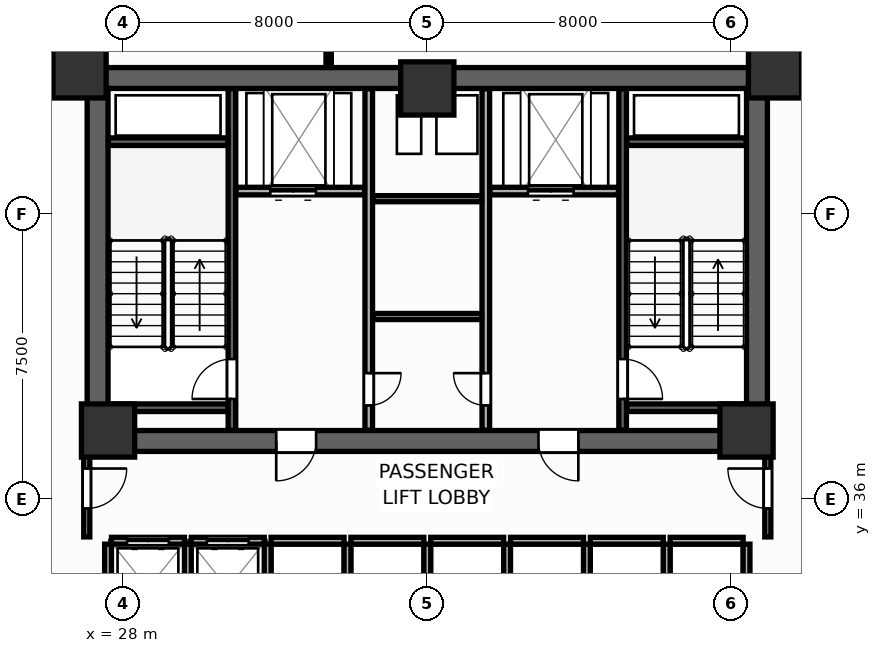
"""IFC4 building model, lengths in metres.
Left out: names, types, materials, properties, quantities, classifications, styles, units other than length and angle.
Written with IfcOpenShell. Run it as: python <this file> out.ifc"""

import sys

from ifc_helpers import new_model, si_unit, direction, frame, frame_2d, origin, origin_2d, place, context, subcontext, project, spatial, rectangle, extrude, source, transform, mapped, element, fill, save


model = new_model("IFC4")
c1 = context("Model", 3, precision=1e-05, world=origin(), true_north=direction((0.0, 1.0)))
c2 = subcontext(c1, "Body", "Model", "MODEL_VIEW")
j1 = project(units=[si_unit("LENGTHUNIT", "METRE"), si_unit("PLANEANGLEUNIT", "RADIAN")], contexts=[c1])
p1 = place(None, origin())
s1 = spatial("IfcSite", under=j1, at=p1, CompositionType="ELEMENT")
p2 = place(p1, origin())
s2 = spatial("IfcBuilding", under=s1, at=p2, CompositionType="ELEMENT")
p3 = place(p2, frame((0.0, 0.0, 31.8)))
s3 = spatial("IfcBuildingStorey", under=s2, at=p3, CompositionType="ELEMENT", Elevation=31.8)
p4 = place(p3, frame((27.05, 47.075, 0.0), z_axis=(0.0, 0.0, 1.0), x_axis=(1.0, 0.0, 0.0)))
e1 = element("IfcWall", 1, at=p4, inside=s3, PredefinedType="SHEAR", context=c2, shape_type="SweptSolid", body=[
    extrude(rectangle(XDim=17.9, YDim=0.55, at=frame_2d((8.95, 0.0))), origin(), (0.0, 0.0, 1.0), 3.9),
])
p5 = place(p3, frame((27.05, 37.525, 0.0), z_axis=(0.0, 0.0, 1.0), x_axis=(1.0, 0.0, 0.0)))
e2 = element("IfcWall", 2, at=p5, inside=s3, PredefinedType="SHEAR", context=c2, shape_type="SweptSolid", body=[
    extrude(rectangle(XDim=17.9, YDim=0.55, at=frame_2d((8.95, 0.0))), origin(), (0.0, 0.0, 1.0), 3.9),
])
p6 = place(p5, frame((4.975, 0.0, 0.0)))
e3 = element("IfcOpeningElement", 3, at=p6, cuts=e2, PredefinedType="OPENING", context=c2, shape_type="SweptSolid", body=[
    extrude(rectangle(XDim=1.05, YDim=2.1, at=frame_2d((0.525, 1.05))), frame((0.0, 0.285, 0.0), z_axis=(0.0, -1.0, 0.0), x_axis=(1.0, 0.0, 0.0)), (0.0, 0.0, 1.0), 0.57),
])
p7 = place(p5, frame((11.875, 0.0, 0.0)))
e4 = element("IfcOpeningElement", 4, at=p7, cuts=e2, PredefinedType="OPENING", context=c2, shape_type="SweptSolid", body=[
    extrude(rectangle(XDim=1.05, YDim=2.1, at=frame_2d((0.525, 1.05))), frame((0.0, 0.285, 0.0), z_axis=(0.0, -1.0, 0.0), x_axis=(1.0, 0.0, 0.0)), (0.0, 0.0, 1.0), 0.57),
])
for number, where, z_axis, x_axis in (
    (5, (27.325, 37.8, 0.0), (0.0, 0.0, 1.0), (0.0, 1.0, 0.0)),
    (6, (44.675, 37.8, 0.0), (0.0, 0.0, 1.0), (0.0, 1.0, 0.0)),
):
    element("IfcWall", number, at=place(p3, frame(where, z_axis=z_axis, x_axis=x_axis)), inside=s3, PredefinedType="SHEAR", context=c2, shape_type="SweptSolid", body=[
        extrude(rectangle(XDim=9.0, YDim=0.55, at=frame_2d((4.5, 0.0))), origin(), (0.0, 0.0, 1.0), 3.9),
    ])
m1 = source(origin(), c2, "Body", "SweptSolid", [
    extrude(rectangle(XDim=1.4, YDim=1.4, at=origin_2d()), origin(), (0.0, 0.0, 1.0), 3.9),
])
for number, where, z_axis, x_axis in (
    (7, (26.85, 47.25, 0.0), (0.0, 0.0, 1.0), (1.0, 0.0, 0.0)),
    (8, (45.15, 47.25, 0.0), (0.0, 0.0, 1.0), (1.0, 0.0, 0.0)),
    (9, (27.6, 37.8, 0.0), (0.0, 0.0, 1.0), (1.0, 0.0, 0.0)),
    (10, (44.4, 37.8, 0.0), (0.0, 0.0, 1.0), (1.0, 0.0, 0.0)),
    (11, (36.0, 46.8, 0.0), (0.0, 0.0, 1.0), (1.0, 0.0, 0.0)),
):
    element("IfcColumn", number, at=place(p3, frame(where, z_axis=z_axis, x_axis=x_axis)), inside=s3, PredefinedType="COLUMN", context=c2, shape_type="MappedRepresentation", body=[
        mapped(m1, transform((0.0, 0.0, 0.0), scale=1.0)),
    ])
p8 = place(p3, frame((30.86, 37.81, 0.0), z_axis=(0.0, 0.0, 1.0), x_axis=(0.0, 1.0, 0.0)))
e12 = element("IfcWall", 12, at=p8, inside=s3, PredefinedType="SHEAR", context=c2, shape_type="SweptSolid", body=[
    extrude(rectangle(XDim=8.98, YDim=0.2, at=frame_2d((4.49, 0.0))), origin(), (0.0, 0.0, 1.0), 3.9),
])
p9 = place(p8, frame((0.82, 0.0, 0.0)))
e13 = element("IfcOpeningElement", 13, at=p9, cuts=e12, PredefinedType="OPENING", context=c2, shape_type="SweptSolid", body=[
    extrude(rectangle(XDim=1.05, YDim=2.1, at=frame_2d((0.525, 1.05))), frame((0.0, 0.11, 0.0), z_axis=(0.0, -1.0, 0.0), x_axis=(1.0, 0.0, 0.0)), (0.0, 0.0, 1.0), 0.22),
])
for number, where, z_axis, x_axis in (
    (14, (27.61, 45.4, 0.0), (0.0, 0.0, 1.0), (1.0, 0.0, 0.0)),
    (15, (27.61, 38.4, 0.0), (0.0, 0.0, 1.0), (1.0, 0.0, 0.0)),
):
    element("IfcWall", number, at=place(p3, frame(where, z_axis=z_axis, x_axis=x_axis)), inside=s3, PredefinedType="SHEAR", context=c2, shape_type="SweptSolid", body=[
        extrude(rectangle(XDim=3.14, YDim=0.2, at=frame_2d((1.57, 0.0))), origin(), (0.0, 0.0, 1.0), 3.9),
    ])
p10 = place(p3, frame((41.14, 37.81, 0.0), z_axis=(0.0, 0.0, 1.0), x_axis=(0.0, 1.0, 0.0)))
e16 = element("IfcWall", 16, at=p10, inside=s3, PredefinedType="SHEAR", context=c2, shape_type="SweptSolid", body=[
    extrude(rectangle(XDim=8.98, YDim=0.2, at=frame_2d((4.49, 0.0))), origin(), (0.0, 0.0, 1.0), 3.9),
])
p11 = place(p10, frame((0.82, 0.0, 0.0)))
e17 = element("IfcOpeningElement", 17, at=p11, cuts=e16, PredefinedType="OPENING", context=c2, shape_type="SweptSolid", body=[
    extrude(rectangle(XDim=1.05, YDim=2.1, at=frame_2d((0.525, 1.05))), frame((0.0, 0.11, 0.0), z_axis=(0.0, -1.0, 0.0), x_axis=(1.0, 0.0, 0.0)), (0.0, 0.0, 1.0), 0.22),
])
for number, where, z_axis, x_axis in (
    (18, (41.25, 45.4, 0.0), (0.0, 0.0, 1.0), (1.0, 0.0, 0.0)),
    (19, (41.25, 38.4, 0.0), (0.0, 0.0, 1.0), (1.0, 0.0, 0.0)),
):
    element("IfcWall", number, at=place(p3, frame(where, z_axis=z_axis, x_axis=x_axis)), inside=s3, PredefinedType="SHEAR", context=c2, shape_type="SweptSolid", body=[
        extrude(rectangle(XDim=3.14, YDim=0.2, at=frame_2d((1.57, 0.0))), origin(), (0.0, 0.0, 1.0), 3.9),
    ])
p12 = place(p3, frame((30.97, 44.1, 0.0), z_axis=(0.0, 0.0, 1.0), x_axis=(1.0, 0.0, 0.0)))
e20 = element("IfcWall", 20, at=p12, inside=s3, PredefinedType="PARTITIONING", context=c2, shape_type="SweptSolid", body=[
    extrude(rectangle(XDim=3.38, YDim=0.2, at=frame_2d((1.69, 0.0))), origin(), (0.0, 0.0, 1.0), 3.68),
])
p13 = place(p12, frame((0.9, 0.0, 0.0)))
e21 = element("IfcOpeningElement", 21, at=p13, cuts=e20, PredefinedType="OPENING", context=c2, shape_type="SweptSolid", body=[
    extrude(rectangle(XDim=1.2, YDim=2.1, at=frame_2d((0.6, 1.05))), frame((0.0, 0.11, 0.0), z_axis=(0.0, -1.0, 0.0), x_axis=(1.0, 0.0, 0.0)), (0.0, 0.0, 1.0), 0.22),
])
p14 = place(p3, frame((37.65, 44.1, 0.0), z_axis=(0.0, 0.0, 1.0), x_axis=(1.0, 0.0, 0.0)))
e22 = element("IfcWall", 22, at=p14, inside=s3, PredefinedType="PARTITIONING", context=c2, shape_type="SweptSolid", body=[
    extrude(rectangle(XDim=3.38, YDim=0.2, at=frame_2d((1.69, 0.0))), origin(), (0.0, 0.0, 1.0), 3.68),
])
p15 = place(p14, frame((1.0, 0.0, 0.0)))
e23 = element("IfcOpeningElement", 23, at=p15, cuts=e22, PredefinedType="OPENING", context=c2, shape_type="SweptSolid", body=[
    extrude(rectangle(XDim=1.2, YDim=2.1, at=frame_2d((0.6, 1.05))), frame((0.0, 0.11, 0.0), z_axis=(0.0, -1.0, 0.0), x_axis=(1.0, 0.0, 0.0)), (0.0, 0.0, 1.0), 0.22),
])
p16 = place(p3, frame((34.46, 37.81, 0.0), z_axis=(0.0, 0.0, 1.0), x_axis=(0.0, 1.0, 0.0)))
e24 = element("IfcWall", 24, at=p16, inside=s3, PredefinedType="PARTITIONING", context=c2, shape_type="SweptSolid", body=[
    extrude(rectangle(XDim=8.98, YDim=0.2, at=frame_2d((4.49, 0.0))), origin(), (0.0, 0.0, 1.0), 3.68),
])
p17 = place(p16, frame((0.65, 0.0, 0.0)))
e25 = element("IfcOpeningElement", 25, at=p17, cuts=e24, PredefinedType="OPENING", context=c2, shape_type="SweptSolid", body=[
    extrude(rectangle(XDim=0.85, YDim=2.05, at=frame_2d((0.425, 1.025))), frame((0.0, 0.11, 0.0), z_axis=(0.0, -1.0, 0.0), x_axis=(1.0, 0.0, 0.0)), (0.0, 0.0, 1.0), 0.22),
])
p18 = place(p3, frame((37.54, 37.81, 0.0), z_axis=(0.0, 0.0, 1.0), x_axis=(0.0, 1.0, 0.0)))
e26 = element("IfcWall", 26, at=p18, inside=s3, PredefinedType="PARTITIONING", context=c2, shape_type="SweptSolid", body=[
    extrude(rectangle(XDim=8.98, YDim=0.2, at=frame_2d((4.49, 0.0))), origin(), (0.0, 0.0, 1.0), 3.68),
])
p19 = place(p18, frame((0.65, 0.0, 0.0)))
e27 = element("IfcOpeningElement", 27, at=p19, cuts=e26, PredefinedType="OPENING", context=c2, shape_type="SweptSolid", body=[
    extrude(rectangle(XDim=0.85, YDim=2.05, at=frame_2d((0.425, 1.025))), frame((0.0, 0.11, 0.0), z_axis=(0.0, -1.0, 0.0), x_axis=(1.0, 0.0, 0.0)), (0.0, 0.0, 1.0), 0.22),
])
for number, where, z_axis, x_axis in (
    (28, (34.57, 40.8, 0.0), (0.0, 0.0, 1.0), (1.0, 0.0, 0.0)),
    (29, (34.57, 43.9, 0.0), (0.0, 0.0, 1.0), (1.0, 0.0, 0.0)),
):
    element("IfcWall", number, at=place(p3, frame(where, z_axis=z_axis, x_axis=x_axis)), inside=s3, PredefinedType="PARTITIONING", context=c2, shape_type="SweptSolid", body=[
        extrude(rectangle(XDim=2.86, YDim=0.16, at=frame_2d((1.43, 0.0))), origin(), (0.0, 0.0, 1.0), 3.68),
    ])
p20 = place(p3, frame((27.69, 34.9, 0.0), z_axis=(0.0, 0.0, 1.0), x_axis=(1.0, 0.0, 0.0)))
e30 = element("IfcWall", 30, at=p20, inside=s3, PredefinedType="PARTITIONING", context=c2, shape_type="SweptSolid", body=[
    extrude(rectangle(XDim=1.92, YDim=0.18, at=frame_2d((0.96, 0.0))), origin(), (0.0, 0.0, 1.0), 3.68),
])
p21 = place(p20, frame((0.41, 0.0, 0.0)))
e31 = element("IfcOpeningElement", 31, at=p21, cuts=e30, PredefinedType="OPENING", context=c2, shape_type="SweptSolid", body=[
    extrude(rectangle(XDim=1.1, YDim=2.1, at=frame_2d((0.55, 1.05))), frame((0.0, 0.1, 0.0), z_axis=(0.0, -1.0, 0.0), x_axis=(1.0, 0.0, 0.0)), (0.0, 0.0, 1.0), 0.2),
])
p22 = place(p3, frame((27.6, 32.49, 0.0), z_axis=(0.0, 0.0, 1.0), x_axis=(0.0, 1.0, 0.0)))
e32 = element("IfcWall", 32, at=p22, inside=s3, PredefinedType="PARTITIONING", context=c2, shape_type="SweptSolid", body=[
    extrude(rectangle(XDim=2.32, YDim=0.18, at=frame_2d((1.16, 0.0))), origin(), (0.0, 0.0, 1.0), 3.68),
])
p23 = place(p3, frame((29.79, 34.9, 0.0), z_axis=(0.0, 0.0, 1.0), x_axis=(1.0, 0.0, 0.0)))
e33 = element("IfcWall", 33, at=p23, inside=s3, PredefinedType="PARTITIONING", context=c2, shape_type="SweptSolid", body=[
    extrude(rectangle(XDim=1.92, YDim=0.18, at=frame_2d((0.96, 0.0))), origin(), (0.0, 0.0, 1.0), 3.68),
])
p24 = place(p23, frame((0.41, 0.0, 0.0)))
e34 = element("IfcOpeningElement", 34, at=p24, cuts=e33, PredefinedType="OPENING", context=c2, shape_type="SweptSolid", body=[
    extrude(rectangle(XDim=1.1, YDim=2.1, at=frame_2d((0.55, 1.05))), frame((0.0, 0.1, 0.0), z_axis=(0.0, -1.0, 0.0), x_axis=(1.0, 0.0, 0.0)), (0.0, 0.0, 1.0), 0.2),
])
p25 = place(p3, frame((29.7, 32.49, 0.0), z_axis=(0.0, 0.0, 1.0), x_axis=(0.0, 1.0, 0.0)))
e35 = element("IfcWall", 35, at=p25, inside=s3, PredefinedType="PARTITIONING", context=c2, shape_type="SweptSolid", body=[
    extrude(rectangle(XDim=2.32, YDim=0.18, at=frame_2d((1.16, 0.0))), origin(), (0.0, 0.0, 1.0), 3.68),
])
p26 = place(p3, frame((31.89, 34.9, 0.0), z_axis=(0.0, 0.0, 1.0), x_axis=(1.0, 0.0, 0.0)))
e36 = element("IfcWall", 36, at=p26, inside=s3, PredefinedType="PARTITIONING", context=c2, shape_type="SweptSolid", body=[
    extrude(rectangle(XDim=1.92, YDim=0.18, at=frame_2d((0.96, 0.0))), origin(), (0.0, 0.0, 1.0), 3.68),
])
p27 = place(p3, frame((31.8, 32.49, 0.0), z_axis=(0.0, 0.0, 1.0), x_axis=(0.0, 1.0, 0.0)))
e37 = element("IfcWall", 37, at=p27, inside=s3, PredefinedType="PARTITIONING", context=c2, shape_type="SweptSolid", body=[
    extrude(rectangle(XDim=2.32, YDim=0.18, at=frame_2d((1.16, 0.0))), origin(), (0.0, 0.0, 1.0), 3.68),
])
p28 = place(p3, frame((33.99, 34.9, 0.0), z_axis=(0.0, 0.0, 1.0), x_axis=(1.0, 0.0, 0.0)))
e38 = element("IfcWall", 38, at=p28, inside=s3, PredefinedType="PARTITIONING", context=c2, shape_type="SweptSolid", body=[
    extrude(rectangle(XDim=1.92, YDim=0.18, at=frame_2d((0.96, 0.0))), origin(), (0.0, 0.0, 1.0), 3.68),
])
p29 = place(p3, frame((33.9, 32.49, 0.0), z_axis=(0.0, 0.0, 1.0), x_axis=(0.0, 1.0, 0.0)))
e39 = element("IfcWall", 39, at=p29, inside=s3, PredefinedType="PARTITIONING", context=c2, shape_type="SweptSolid", body=[
    extrude(rectangle(XDim=2.32, YDim=0.18, at=frame_2d((1.16, 0.0))), origin(), (0.0, 0.0, 1.0), 3.68),
])
p30 = place(p3, frame((36.09, 34.9, 0.0), z_axis=(0.0, 0.0, 1.0), x_axis=(1.0, 0.0, 0.0)))
e40 = element("IfcWall", 40, at=p30, inside=s3, PredefinedType="PARTITIONING", context=c2, shape_type="SweptSolid", body=[
    extrude(rectangle(XDim=1.92, YDim=0.18, at=frame_2d((0.96, 0.0))), origin(), (0.0, 0.0, 1.0), 3.68),
])
p31 = place(p3, frame((36.0, 32.49, 0.0), z_axis=(0.0, 0.0, 1.0), x_axis=(0.0, 1.0, 0.0)))
e41 = element("IfcWall", 41, at=p31, inside=s3, PredefinedType="PARTITIONING", context=c2, shape_type="SweptSolid", body=[
    extrude(rectangle(XDim=2.32, YDim=0.18, at=frame_2d((1.16, 0.0))), origin(), (0.0, 0.0, 1.0), 3.68),
])
p32 = place(p3, frame((38.19, 34.9, 0.0), z_axis=(0.0, 0.0, 1.0), x_axis=(1.0, 0.0, 0.0)))
e42 = element("IfcWall", 42, at=p32, inside=s3, PredefinedType="PARTITIONING", context=c2, shape_type="SweptSolid", body=[
    extrude(rectangle(XDim=1.92, YDim=0.18, at=frame_2d((0.96, 0.0))), origin(), (0.0, 0.0, 1.0), 3.68),
])
p33 = place(p3, frame((38.1, 32.49, 0.0), z_axis=(0.0, 0.0, 1.0), x_axis=(0.0, 1.0, 0.0)))
e43 = element("IfcWall", 43, at=p33, inside=s3, PredefinedType="PARTITIONING", context=c2, shape_type="SweptSolid", body=[
    extrude(rectangle(XDim=2.32, YDim=0.18, at=frame_2d((1.16, 0.0))), origin(), (0.0, 0.0, 1.0), 3.68),
])
p34 = place(p3, frame((40.29, 34.9, 0.0), z_axis=(0.0, 0.0, 1.0), x_axis=(1.0, 0.0, 0.0)))
e44 = element("IfcWall", 44, at=p34, inside=s3, PredefinedType="PARTITIONING", context=c2, shape_type="SweptSolid", body=[
    extrude(rectangle(XDim=1.92, YDim=0.18, at=frame_2d((0.96, 0.0))), origin(), (0.0, 0.0, 1.0), 3.68),
])
p35 = place(p3, frame((40.2, 32.49, 0.0), z_axis=(0.0, 0.0, 1.0), x_axis=(0.0, 1.0, 0.0)))
e45 = element("IfcWall", 45, at=p35, inside=s3, PredefinedType="PARTITIONING", context=c2, shape_type="SweptSolid", body=[
    extrude(rectangle(XDim=2.32, YDim=0.18, at=frame_2d((1.16, 0.0))), origin(), (0.0, 0.0, 1.0), 3.68),
])
p36 = place(p3, frame((42.39, 34.9, 0.0), z_axis=(0.0, 0.0, 1.0), x_axis=(1.0, 0.0, 0.0)))
e46 = element("IfcWall", 46, at=p36, inside=s3, PredefinedType="PARTITIONING", context=c2, shape_type="SweptSolid", body=[
    extrude(rectangle(XDim=1.92, YDim=0.18, at=frame_2d((0.96, 0.0))), origin(), (0.0, 0.0, 1.0), 3.68),
])
for number, where, z_axis, x_axis in (
    (47, (42.3, 32.49, 0.0), (0.0, 0.0, 1.0), (0.0, 1.0, 0.0)),
    (48, (44.4, 32.49, 0.0), (0.0, 0.0, 1.0), (0.0, 1.0, 0.0)),
):
    element("IfcWall", number, at=place(p3, frame(where, z_axis=z_axis, x_axis=x_axis)), inside=s3, PredefinedType="PARTITIONING", context=c2, shape_type="SweptSolid", body=[
        extrude(rectangle(XDim=2.32, YDim=0.18, at=frame_2d((1.16, 0.0))), origin(), (0.0, 0.0, 1.0), 3.68),
    ])
p37 = place(p3, frame((27.04, 35.0, 0.0), z_axis=(0.0, 0.0, 1.0), x_axis=(0.0, 1.0, 0.0)))
e49 = element("IfcWall", 49, at=p37, inside=s3, PredefinedType="PARTITIONING", context=c2, shape_type="SweptSolid", body=[
    extrude(rectangle(XDim=2.65, YDim=0.16, at=frame_2d((1.325, 0.0))), origin(), (0.0, 0.0, 1.0), 3.68),
])
p38 = place(p37, frame((0.75, 0.0, 0.0)))
e50 = element("IfcOpeningElement", 50, at=p38, cuts=e49, PredefinedType="OPENING", context=c2, shape_type="SweptSolid", body=[
    extrude(rectangle(XDim=1.05, YDim=2.1, at=frame_2d((0.525, 1.05))), frame((0.0, 0.09, 0.0), z_axis=(0.0, -1.0, 0.0), x_axis=(1.0, 0.0, 0.0)), (0.0, 0.0, 1.0), 0.18),
])
p39 = place(p3, frame((44.96, 35.0, 0.0), z_axis=(0.0, 0.0, 1.0), x_axis=(0.0, 1.0, 0.0)))
e51 = element("IfcWall", 51, at=p39, inside=s3, PredefinedType="PARTITIONING", context=c2, shape_type="SweptSolid", body=[
    extrude(rectangle(XDim=2.65, YDim=0.16, at=frame_2d((1.325, 0.0))), origin(), (0.0, 0.0, 1.0), 3.68),
])
p40 = place(p39, frame((0.75, 0.0, 0.0)))
e52 = element("IfcOpeningElement", 52, at=p40, cuts=e51, PredefinedType="OPENING", context=c2, shape_type="SweptSolid", body=[
    extrude(rectangle(XDim=1.05, YDim=2.1, at=frame_2d((0.525, 1.05))), frame((0.0, 0.09, 0.0), z_axis=(0.0, -1.0, 0.0), x_axis=(1.0, 0.0, 0.0)), (0.0, 0.0, 1.0), 0.18),
])
p41 = place(p3, frame((27.035, 47.34, 0.0), z_axis=(0.0, 0.0, 1.0), x_axis=(0.0, 1.0, 0.0)))
e53 = element("IfcWall", 53, at=p41, inside=s3, PredefinedType="PARTITIONING", context=c2, shape_type="SweptSolid", body=[
    extrude(rectangle(XDim=10.41, YDim=0.16, at=frame_2d((5.205, 0.0))), origin(), (0.0, 0.0, 1.0), 2.24),
])
p42 = place(p41, frame((4.73, 0.0, 0.0)))
e54 = element("IfcOpeningElement", 54, at=p42, cuts=e53, PredefinedType="OPENING", context=c2, shape_type="SweptSolid", body=[
    extrude(rectangle(XDim=0.95, YDim=2.05, at=frame_2d((0.475, 1.025))), frame((0.0, 0.09, 0.0), z_axis=(0.0, -1.0, 0.0), x_axis=(1.0, 0.0, 0.0)), (0.0, 0.0, 1.0), 0.18),
])
p43 = place(p3, frame((44.965, 47.34, 0.0), z_axis=(0.0, 0.0, 1.0), x_axis=(0.0, 1.0, 0.0)))
e55 = element("IfcWall", 55, at=p43, inside=s3, PredefinedType="PARTITIONING", context=c2, shape_type="SweptSolid", body=[
    extrude(rectangle(XDim=10.41, YDim=0.16, at=frame_2d((5.205, 0.0))), origin(), (0.0, 0.0, 1.0), 2.24),
])
p44 = place(p3, frame((33.405, 47.352, 0.0), z_axis=(0.0, 0.0, 1.0), x_axis=(0.0, 1.0, 0.0)))
e56 = element("IfcWall", 56, at=p44, inside=s3, PredefinedType="PARTITIONING", context=c2, shape_type="SweptSolid", body=[
    extrude(rectangle(XDim=10.545, YDim=0.14, at=frame_2d((5.272, 0.0))), origin(), (0.0, 0.0, 1.0), 3.68),
])
p45 = place(p44, frame((4.798, 0.0, 0.0)))
e57 = element("IfcOpeningElement", 57, at=p45, cuts=e56, PredefinedType="OPENING", context=c2, shape_type="SweptSolid", body=[
    extrude(rectangle(XDim=0.95, YDim=2.05, at=frame_2d((0.475, 1.025))), frame((0.0, 0.08, 0.0), z_axis=(0.0, -1.0, 0.0), x_axis=(1.0, 0.0, 0.0)), (0.0, 0.0, 1.0), 0.16),
])
p46 = place(p9, origin())
e58 = element("IfcDoor", 58, at=p46, inside=s3, OperationType="SINGLE_SWING_LEFT", PredefinedType="DOOR", context=c2, shape_type="SweptSolid", body=[
    extrude(rectangle(XDim=1.05, YDim=2.1, at=frame_2d((0.525, 1.05))), frame((0.0, 0.025, 0.0), z_axis=(0.0, -1.0, 0.0), x_axis=(1.0, 0.0, 0.0)), (0.0, 0.0, 1.0), 0.05),
])
fill(e13, e58)
p47 = place(p11, frame((1.05, 0.0, 0.0), z_axis=(0.0, 0.0, 1.0), x_axis=(-1.0, 0.0, 0.0)))
e59 = element("IfcDoor", 59, at=p47, inside=s3, OperationType="SINGLE_SWING_RIGHT", PredefinedType="DOOR", context=c2, shape_type="SweptSolid", body=[
    extrude(rectangle(XDim=1.05, YDim=2.1, at=frame_2d((0.525, 1.05))), frame((0.0, 0.025, 0.0), z_axis=(0.0, -1.0, 0.0), x_axis=(1.0, 0.0, 0.0)), (0.0, 0.0, 1.0), 0.05),
])
fill(e17, e59)
p48 = place(p13, origin())
e60 = element("IfcDoor", 60, at=p48, inside=s3, OperationType="DOUBLE_DOOR_SLIDING", PredefinedType="DOOR", context=c2, shape_type="SweptSolid", body=[
    extrude(rectangle(XDim=1.2, YDim=2.1, at=frame_2d((0.6, 1.05))), frame((0.0, 0.025, 0.0), z_axis=(0.0, -1.0, 0.0), x_axis=(1.0, 0.0, 0.0)), (0.0, 0.0, 1.0), 0.05),
])
fill(e21, e60)
p49 = place(p15, origin())
e61 = element("IfcDoor", 61, at=p49, inside=s3, OperationType="DOUBLE_DOOR_SLIDING", PredefinedType="DOOR", context=c2, shape_type="SweptSolid", body=[
    extrude(rectangle(XDim=1.2, YDim=2.1, at=frame_2d((0.6, 1.05))), frame((0.0, 0.025, 0.0), z_axis=(0.0, -1.0, 0.0), x_axis=(1.0, 0.0, 0.0)), (0.0, 0.0, 1.0), 0.05),
])
fill(e23, e61)
p50 = place(p17, frame((0.85, 0.0, 0.0), z_axis=(0.0, 0.0, 1.0), x_axis=(-1.0, 0.0, 0.0)))
e62 = element("IfcDoor", 62, at=p50, inside=s3, OperationType="SINGLE_SWING_LEFT", PredefinedType="DOOR", context=c2, shape_type="SweptSolid", body=[
    extrude(rectangle(XDim=0.85, YDim=2.05, at=frame_2d((0.425, 1.025))), frame((0.0, 0.025, 0.0), z_axis=(0.0, -1.0, 0.0), x_axis=(1.0, 0.0, 0.0)), (0.0, 0.0, 1.0), 0.05),
])
fill(e25, e62)
p51 = place(p19, origin())
e63 = element("IfcDoor", 63, at=p51, inside=s3, OperationType="SINGLE_SWING_RIGHT", PredefinedType="DOOR", context=c2, shape_type="SweptSolid", body=[
    extrude(rectangle(XDim=0.85, YDim=2.05, at=frame_2d((0.425, 1.025))), frame((0.0, 0.025, 0.0), z_axis=(0.0, -1.0, 0.0), x_axis=(1.0, 0.0, 0.0)), (0.0, 0.0, 1.0), 0.05),
])
fill(e27, e63)
p52 = place(p21, origin())
e64 = element("IfcDoor", 64, at=p52, inside=s3, OperationType="DOUBLE_DOOR_SLIDING", PredefinedType="DOOR", context=c2, shape_type="SweptSolid", body=[
    extrude(rectangle(XDim=1.1, YDim=2.1, at=frame_2d((0.55, 1.05))), frame((0.0, 0.025, 0.0), z_axis=(0.0, -1.0, 0.0), x_axis=(1.0, 0.0, 0.0)), (0.0, 0.0, 1.0), 0.05),
])
fill(e31, e64)
p53 = place(p24, origin())
e65 = element("IfcDoor", 65, at=p53, inside=s3, OperationType="DOUBLE_DOOR_SLIDING", PredefinedType="DOOR", context=c2, shape_type="SweptSolid", body=[
    extrude(rectangle(XDim=1.1, YDim=2.1, at=frame_2d((0.55, 1.05))), frame((0.0, 0.025, 0.0), z_axis=(0.0, -1.0, 0.0), x_axis=(1.0, 0.0, 0.0)), (0.0, 0.0, 1.0), 0.05),
])
fill(e34, e65)
p54 = place(p38, frame((1.05, 0.0, 0.0), z_axis=(0.0, 0.0, 1.0), x_axis=(-1.0, 0.0, 0.0)))
e66 = element("IfcDoor", 66, at=p54, inside=s3, OperationType="SINGLE_SWING_LEFT", PredefinedType="DOOR", context=c2, shape_type="SweptSolid", body=[
    extrude(rectangle(XDim=1.05, YDim=2.1, at=frame_2d((0.525, 1.05))), frame((0.0, 0.025, 0.0), z_axis=(0.0, -1.0, 0.0), x_axis=(1.0, 0.0, 0.0)), (0.0, 0.0, 1.0), 0.05),
])
fill(e50, e66)
p55 = place(p40, origin())
e67 = element("IfcDoor", 67, at=p55, inside=s3, OperationType="SINGLE_SWING_RIGHT", PredefinedType="DOOR", context=c2, shape_type="SweptSolid", body=[
    extrude(rectangle(XDim=1.05, YDim=2.1, at=frame_2d((0.525, 1.05))), frame((0.0, 0.025, 0.0), z_axis=(0.0, -1.0, 0.0), x_axis=(1.0, 0.0, 0.0)), (0.0, 0.0, 1.0), 0.05),
])
fill(e52, e67)
p56 = place(p6, frame((1.05, 0.0, 0.0), z_axis=(0.0, 0.0, 1.0), x_axis=(-1.0, 0.0, 0.0)))
e68 = element("IfcDoor", 68, at=p56, inside=s3, OperationType="SINGLE_SWING_RIGHT", PredefinedType="DOOR", context=c2, shape_type="SweptSolid", body=[
    extrude(rectangle(XDim=1.05, YDim=2.1, at=frame_2d((0.525, 1.05))), frame((0.0, 0.025, 0.0), z_axis=(0.0, -1.0, 0.0), x_axis=(1.0, 0.0, 0.0)), (0.0, 0.0, 1.0), 0.05),
])
fill(e3, e68)
p57 = place(p7, frame((1.05, 0.0, 0.0), z_axis=(0.0, 0.0, 1.0), x_axis=(-1.0, 0.0, 0.0)))
e69 = element("IfcDoor", 69, at=p57, inside=s3, OperationType="SINGLE_SWING_LEFT", PredefinedType="DOOR", context=c2, shape_type="SweptSolid", body=[
    extrude(rectangle(XDim=1.05, YDim=2.1, at=frame_2d((0.525, 1.05))), frame((0.0, 0.025, 0.0), z_axis=(0.0, -1.0, 0.0), x_axis=(1.0, 0.0, 0.0)), (0.0, 0.0, 1.0), 0.05),
])
fill(e4, e69)
save(model, sys.argv[1])
